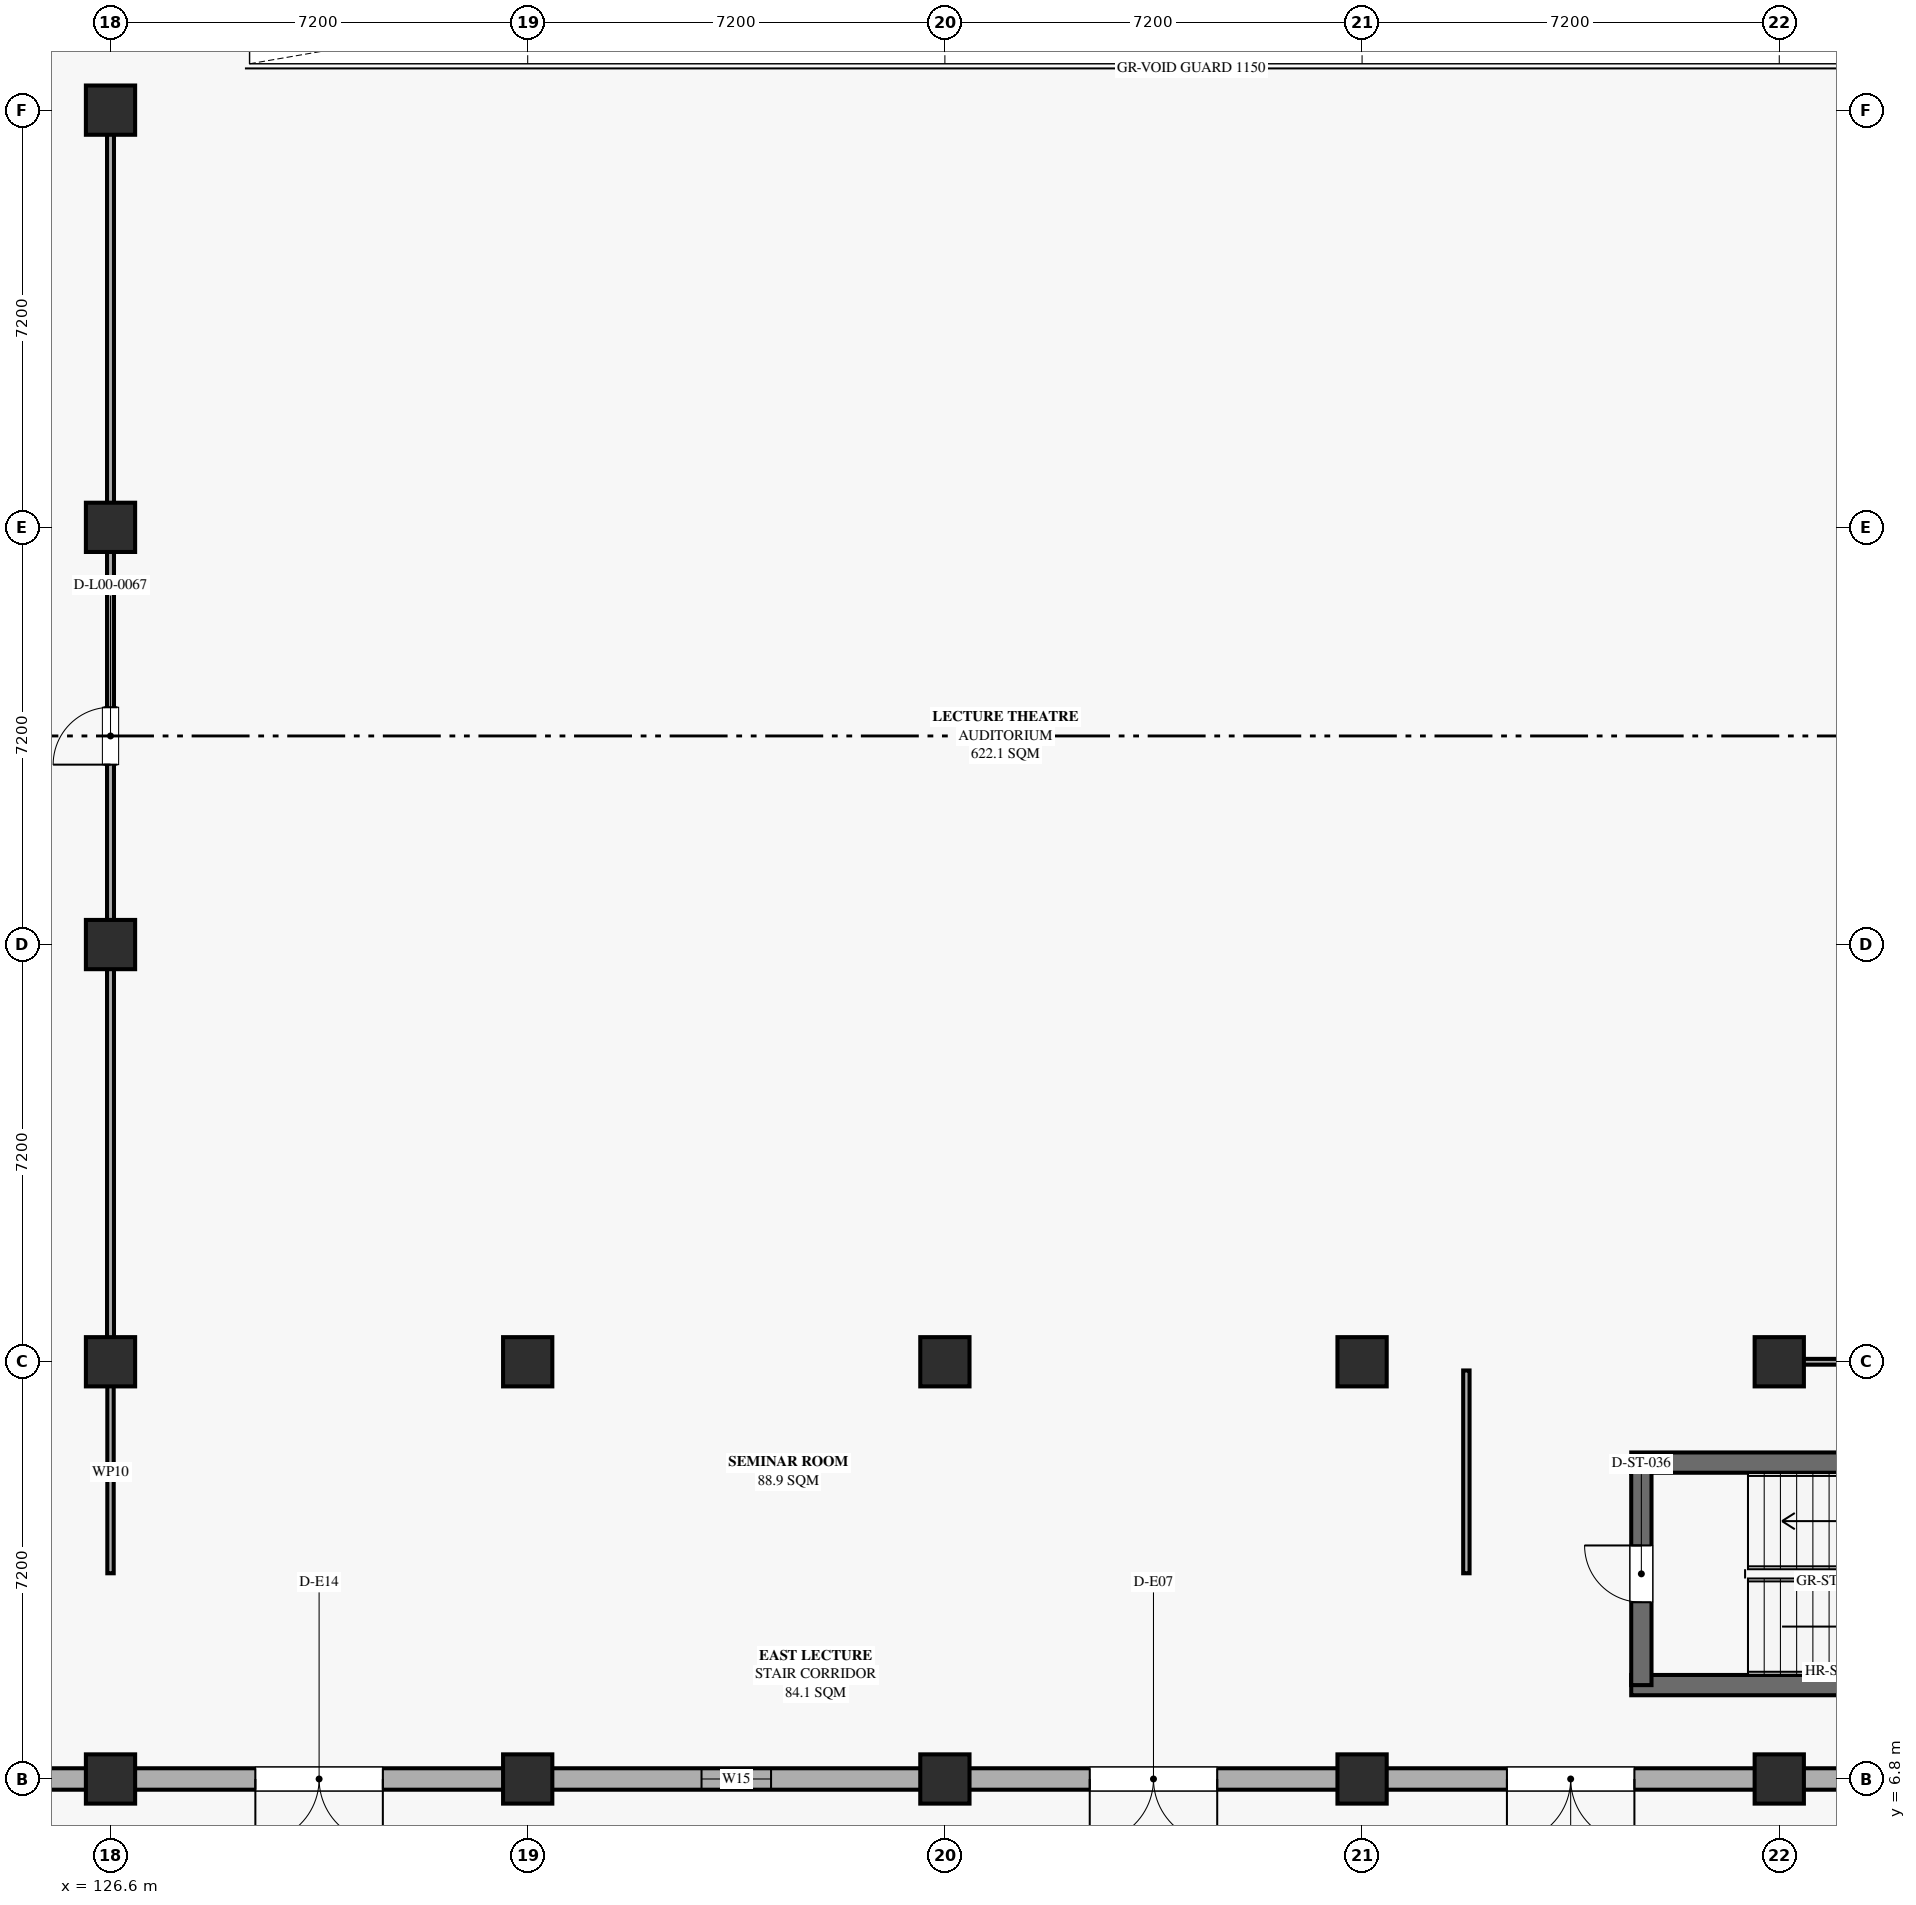
"""IFC4 building model, lengths in metres.
Left out: names, types, materials, properties, quantities, classifications, styles, units other than length and angle.
Written with IfcOpenShell. Run it as: python <this file> out.ifc"""

import sys

from ifc_helpers import new_model, si_unit, direction, frame, frame_2d, origin, origin_2d, place, context, subcontext, project, spatial, rectangle, extrude, element, fill, save


model = new_model("IFC4")
c1 = context("Model", 3, precision=1e-05, world=origin(), true_north=direction((0.0, 1.0)))
c2 = subcontext(c1, "Body", "Model", "MODEL_VIEW")
j1 = project(units=[si_unit("LENGTHUNIT", "METRE"), si_unit("PLANEANGLEUNIT", "RADIAN")], contexts=[c1])
p1 = place(None, origin())
s1 = spatial("IfcSite", under=j1, at=p1, CompositionType="ELEMENT")
p2 = place(p1, origin())
s2 = spatial("IfcBuilding", under=s1, at=p2, CompositionType="ELEMENT")
p3 = place(p2, origin())
s3 = spatial("IfcBuildingStorey", under=s2, at=p3, CompositionType="ELEMENT", Elevation=0.0)
for number, where, z_axis, x_axis in (
    (1, (126.6, 6.8, 0.0), (0.0, 0.0, 1.0), (1.0, 0.0, 0.0)),
    (2, (133.8, 6.8, 0.0), (0.0, 0.0, 1.0), (1.0, 0.0, 0.0)),
    (3, (141.0, 6.8, 0.0), (0.0, 0.0, 1.0), (1.0, 0.0, 0.0)),
    (4, (148.2, 6.8, 0.0), (0.0, 0.0, 1.0), (1.0, 0.0, 0.0)),
    (5, (155.4, 6.8, 0.0), (0.0, 0.0, 1.0), (1.0, 0.0, 0.0)),
    (6, (126.6, 14.0, 0.0), (0.0, 0.0, 1.0), (1.0, 0.0, 0.0)),
    (7, (133.8, 14.0, 0.0), (0.0, 0.0, 1.0), (1.0, 0.0, 0.0)),
    (8, (141.0, 14.0, 0.0), (0.0, 0.0, 1.0), (1.0, 0.0, 0.0)),
    (9, (148.2, 14.0, 0.0), (0.0, 0.0, 1.0), (1.0, 0.0, 0.0)),
    (10, (155.4, 14.0, 0.0), (0.0, 0.0, 1.0), (1.0, 0.0, 0.0)),
    (11, (126.6, 21.2, 0.0), (0.0, 0.0, 1.0), (1.0, 0.0, 0.0)),
    (12, (126.6, 28.4, 0.0), (0.0, 0.0, 1.0), (1.0, 0.0, 0.0)),
    (13, (126.6, 35.6, 0.0), (0.0, 0.0, 1.0), (1.0, 0.0, 0.0)),
):
    element("IfcColumn", number, at=place(p3, frame(where, z_axis=z_axis, x_axis=x_axis)), inside=s3, PredefinedType="COLUMN", context=c2, shape_type="SweptSolid", body=[
        extrude(rectangle(XDim=0.85, YDim=0.85, at=origin_2d()), origin(), (0.0, 0.0, 1.0), 5.4),
    ])
p4 = place(p3, frame((162.19, 6.8, 0.0), z_axis=(0.0, 0.0, 1.0), x_axis=(-1.0, 0.0, 0.0)))
e14 = element("IfcWall", 14, at=p4, inside=s3, PredefinedType="SOLIDWALL", context=c2, shape_type="SweptSolid", body=[
    extrude(rectangle(XDim=6.38, YDim=0.37, at=frame_2d((3.19, 0.0))), origin(), (0.0, 0.0, 1.0), 3.9),
])
p5 = place(p4, frame((2.14, 0.0, 0.9)))
e15 = element("IfcOpeningElement", 15, at=p5, cuts=e14, PredefinedType="OPENING", context=c2, shape_type="SweptSolid", body=[
    extrude(rectangle(XDim=2.1, YDim=1.8, at=frame_2d((1.05, 0.9))), frame((0.0, 0.195, 0.0), z_axis=(0.0, -1.0, 0.0), x_axis=(1.0, 0.0, 0.0)), (0.0, 0.0, 1.0), 0.39),
])
p6 = place(p3, frame((154.99, 6.8, 0.0), z_axis=(0.0, 0.0, 1.0), x_axis=(-1.0, 0.0, 0.0)))
e16 = element("IfcWall", 16, at=p6, inside=s3, PredefinedType="SOLIDWALL", context=c2, shape_type="SweptSolid", body=[
    extrude(rectangle(XDim=6.38, YDim=0.37, at=frame_2d((3.19, 0.0))), origin(), (0.0, 0.0, 1.0), 3.9),
])
p7 = place(p6, frame((2.09, 0.0, 0.0)))
e17 = element("IfcOpeningElement", 17, at=p7, cuts=e16, PredefinedType="OPENING", context=c2, shape_type="SweptSolid", body=[
    extrude(rectangle(XDim=2.2, YDim=2.4, at=frame_2d((1.1, 1.2))), frame((0.0, 0.195, 0.0), z_axis=(0.0, -1.0, 0.0), x_axis=(1.0, 0.0, 0.0)), (0.0, 0.0, 1.0), 0.39),
])
p8 = place(p3, frame((147.79, 6.8, 0.0), z_axis=(0.0, 0.0, 1.0), x_axis=(-1.0, 0.0, 0.0)))
e18 = element("IfcWall", 18, at=p8, inside=s3, PredefinedType="SOLIDWALL", context=c2, shape_type="SweptSolid", body=[
    extrude(rectangle(XDim=6.38, YDim=0.37, at=frame_2d((3.19, 0.0))), origin(), (0.0, 0.0, 1.0), 3.9),
])
p9 = place(p8, frame((2.09, 0.0, 0.0)))
e19 = element("IfcOpeningElement", 19, at=p9, cuts=e18, PredefinedType="OPENING", context=c2, shape_type="SweptSolid", body=[
    extrude(rectangle(XDim=2.2, YDim=2.4, at=frame_2d((1.1, 1.2))), frame((0.0, 0.195, 0.0), z_axis=(0.0, -1.0, 0.0), x_axis=(1.0, 0.0, 0.0)), (0.0, 0.0, 1.0), 0.39),
])
p10 = place(p3, frame((140.59, 6.8, 0.0), z_axis=(0.0, 0.0, 1.0), x_axis=(-1.0, 0.0, 0.0)))
e20 = element("IfcWall", 20, at=p10, inside=s3, PredefinedType="SOLIDWALL", context=c2, shape_type="SweptSolid", body=[
    extrude(rectangle(XDim=6.38, YDim=0.37, at=frame_2d((3.19, 0.0))), origin(), (0.0, 0.0, 1.0), 3.9),
])
p11 = place(p10, frame((2.59, 0.0, 0.9)))
e21 = element("IfcOpeningElement", 21, at=p11, cuts=e20, PredefinedType="OPENING", context=c2, shape_type="SweptSolid", body=[
    extrude(rectangle(XDim=1.2, YDim=1.8, at=frame_2d((0.6, 0.9))), frame((0.0, 0.195, 0.0), z_axis=(0.0, -1.0, 0.0), x_axis=(1.0, 0.0, 0.0)), (0.0, 0.0, 1.0), 0.39),
])
p12 = place(p3, frame((133.39, 6.8, 0.0), z_axis=(0.0, 0.0, 1.0), x_axis=(-1.0, 0.0, 0.0)))
e22 = element("IfcWall", 22, at=p12, inside=s3, PredefinedType="SOLIDWALL", context=c2, shape_type="SweptSolid", body=[
    extrude(rectangle(XDim=6.38, YDim=0.37, at=frame_2d((3.19, 0.0))), origin(), (0.0, 0.0, 1.0), 3.9),
])
p13 = place(p12, frame((2.09, 0.0, 0.0)))
e23 = element("IfcOpeningElement", 23, at=p13, cuts=e22, PredefinedType="OPENING", context=c2, shape_type="SweptSolid", body=[
    extrude(rectangle(XDim=2.2, YDim=2.4, at=frame_2d((1.1, 1.2))), frame((0.0, 0.195, 0.0), z_axis=(0.0, -1.0, 0.0), x_axis=(1.0, 0.0, 0.0)), (0.0, 0.0, 1.0), 0.39),
])
p14 = place(p3, frame((126.19, 6.8, 0.0), z_axis=(0.0, 0.0, 1.0), x_axis=(-1.0, 0.0, 0.0)))
e24 = element("IfcWall", 24, at=p14, inside=s3, PredefinedType="SOLIDWALL", context=c2, shape_type="SweptSolid", body=[
    extrude(rectangle(XDim=6.33, YDim=0.37, at=frame_2d((3.165, 0.0))), origin(), (0.0, 0.0, 1.0), 3.9),
])
p15 = place(p14, frame((2.065, 0.0, 0.0)))
e25 = element("IfcOpeningElement", 25, at=p15, cuts=e24, PredefinedType="OPENING", context=c2, shape_type="SweptSolid", body=[
    extrude(rectangle(XDim=2.2, YDim=2.4, at=frame_2d((1.1, 1.2))), frame((0.0, 0.195, 0.0), z_axis=(0.0, -1.0, 0.0), x_axis=(1.0, 0.0, 0.0)), (0.0, 0.0, 1.0), 0.39),
])
for number, where, z_axis, x_axis in (
    (26, (160.855, 8.42, 0.0), (0.0, 0.0, 1.0), (-1.0, 0.0, 0.0)),
    (27, (152.845, 12.26, 0.0), (0.0, 0.0, 1.0), (1.0, 0.0, 0.0)),
):
    element("IfcWall", number, at=place(p3, frame(where, z_axis=z_axis, x_axis=x_axis)), inside=s3, PredefinedType="SHEAR", context=c2, shape_type="SweptSolid", body=[
        extrude(rectangle(XDim=8.01, YDim=0.35, at=frame_2d((4.005, 0.0))), origin(), (0.0, 0.0, 1.0), 5.13),
    ])
p16 = place(p3, frame((153.02, 8.42, 0.0), z_axis=(0.0, 0.0, 1.0), x_axis=(0.0, 1.0, 0.0)))
e28 = element("IfcWall", 28, at=p16, inside=s3, PredefinedType="SHEAR", context=c2, shape_type="SweptSolid", body=[
    extrude(rectangle(XDim=3.84, YDim=0.35, at=frame_2d((1.92, 0.0))), origin(), (0.0, 0.0, 1.0), 5.13),
])
p17 = place(p16, frame((1.43, 0.0, 0.0)))
e29 = element("IfcOpeningElement", 29, at=p17, cuts=e28, PredefinedType="OPENING", context=c2, shape_type="SweptSolid", body=[
    extrude(rectangle(XDim=0.98, YDim=2.06, at=frame_2d((0.49, 1.03))), frame((0.0, 0.185, 0.0), z_axis=(0.0, -1.0, 0.0), x_axis=(1.0, 0.0, 0.0)), (0.0, 0.0, 1.0), 0.37),
])
p18 = place(p3, frame((126.6, 14.15, 0.0), z_axis=(0.0, 0.0, 1.0), x_axis=(0.0, 1.0, 0.0)))
e30 = element("IfcWall", 30, at=p18, inside=s3, PredefinedType="PARTITIONING", context=c2, shape_type="SweptSolid", body=[
    extrude(rectangle(XDim=21.3, YDim=0.12, at=frame_2d((10.65, 0.0))), origin(), (0.0, 0.0, 1.0), 3.88),
])
p19 = place(p18, frame((10.155, 0.0, 0.0)))
e31 = element("IfcOpeningElement", 31, at=p19, cuts=e30, PredefinedType="OPENING", context=c2, shape_type="SweptSolid", body=[
    extrude(rectangle(XDim=0.99, YDim=2.05, at=frame_2d((0.495, 1.025))), frame((0.0, 0.07, 0.0), z_axis=(0.0, -1.0, 0.0), x_axis=(1.0, 0.0, 0.0)), (0.0, 0.0, 1.0), 0.14),
])
for number, where, z_axis, x_axis in (
    (32, (126.6, 10.35, 0.0), (0.0, 0.0, 1.0), (0.0, 1.0, 0.0)),
    (33, (150.0, 13.85, 0.0), (0.0, 0.0, 1.0), (0.0, -1.0, 0.0)),
):
    element("IfcWall", number, at=place(p3, frame(where, z_axis=z_axis, x_axis=x_axis)), inside=s3, PredefinedType="PARTITIONING", context=c2, shape_type="SweptSolid", body=[
        extrude(rectangle(XDim=3.5, YDim=0.11, at=frame_2d((1.75, 0.0))), origin(), (0.0, 0.0, 1.0), 3.88),
    ])
p20 = place(p3, frame((162.25, 14.0, 0.0), z_axis=(0.0, 0.0, 1.0), x_axis=(-1.0, 0.0, 0.0)))
e34 = element("IfcWall", 34, at=p20, inside=s3, PredefinedType="PARTITIONING", context=c2, shape_type="SweptSolid", body=[
    extrude(rectangle(XDim=6.7, YDim=0.1, at=frame_2d((3.35, 0.0))), origin(), (0.0, 0.0, 1.0), 3.88),
])
p21 = place(p20, frame((2.855, 0.0, 0.0)))
e35 = element("IfcOpeningElement", 35, at=p21, cuts=e34, PredefinedType="OPENING", context=c2, shape_type="SweptSolid", body=[
    extrude(rectangle(XDim=0.99, YDim=2.1, at=frame_2d((0.495, 1.05))), frame((0.0, 0.06, 0.0), z_axis=(0.0, -1.0, 0.0), x_axis=(1.0, 0.0, 0.0)), (0.0, 0.0, 1.0), 0.12),
])
p22 = place(p7, origin())
e36 = element("IfcDoor", 36, at=p22, inside=s3, OperationType="DOUBLE_DOOR_SINGLE_SWING", PredefinedType="DOOR", context=c2, shape_type="SweptSolid", body=[
    extrude(rectangle(XDim=2.2, YDim=2.4, at=frame_2d((1.1, 1.2))), frame((0.0, 0.025, 0.0), z_axis=(0.0, -1.0, 0.0), x_axis=(1.0, 0.0, 0.0)), (0.0, 0.0, 1.0), 0.05),
])
fill(e17, e36)
p23 = place(p9, origin())
e37 = element("IfcDoor", 37, at=p23, inside=s3, OperationType="DOUBLE_DOOR_SINGLE_SWING", PredefinedType="DOOR", context=c2, shape_type="SweptSolid", body=[
    extrude(rectangle(XDim=2.2, YDim=2.4, at=frame_2d((1.1, 1.2))), frame((0.0, 0.025, 0.0), z_axis=(0.0, -1.0, 0.0), x_axis=(1.0, 0.0, 0.0)), (0.0, 0.0, 1.0), 0.05),
])
fill(e19, e37)
p24 = place(p11, origin())
e38 = element("IfcWindow", 38, at=p24, inside=s3, PartitioningType="SINGLE_PANEL", PredefinedType="WINDOW", context=c2, shape_type="SweptSolid", body=[
    extrude(rectangle(XDim=1.2, YDim=1.8, at=frame_2d((0.6, 0.9))), frame((0.0, 0.03, 0.0), z_axis=(0.0, -1.0, 0.0), x_axis=(1.0, 0.0, 0.0)), (0.0, 0.0, 1.0), 0.06),
])
fill(e21, e38)
p25 = place(p13, origin())
e39 = element("IfcDoor", 39, at=p25, inside=s3, OperationType="DOUBLE_DOOR_SINGLE_SWING", PredefinedType="DOOR", context=c2, shape_type="SweptSolid", body=[
    extrude(rectangle(XDim=2.2, YDim=2.4, at=frame_2d((1.1, 1.2))), frame((0.0, 0.025, 0.0), z_axis=(0.0, -1.0, 0.0), x_axis=(1.0, 0.0, 0.0)), (0.0, 0.0, 1.0), 0.05),
])
fill(e23, e39)
p26 = place(p17, origin())
e40 = element("IfcDoor", 40, at=p26, inside=s3, OperationType="SINGLE_SWING_RIGHT", PredefinedType="DOOR", context=c2, shape_type="SweptSolid", body=[
    extrude(rectangle(XDim=0.98, YDim=2.06, at=frame_2d((0.49, 1.03))), frame((0.0, 0.025, 0.0), z_axis=(0.0, -1.0, 0.0), x_axis=(1.0, 0.0, 0.0)), (0.0, 0.0, 1.0), 0.05),
])
fill(e29, e40)
p27 = place(p19, origin())
e41 = element("IfcDoor", 41, at=p27, inside=s3, OperationType="SINGLE_SWING_LEFT", PredefinedType="DOOR", context=c2, shape_type="SweptSolid", body=[
    extrude(rectangle(XDim=0.99, YDim=2.05, at=frame_2d((0.495, 1.025))), frame((0.0, 0.025, 0.0), z_axis=(0.0, -1.0, 0.0), x_axis=(1.0, 0.0, 0.0)), (0.0, 0.0, 1.0), 0.05),
])
fill(e31, e41)
save(model, sys.argv[1])
